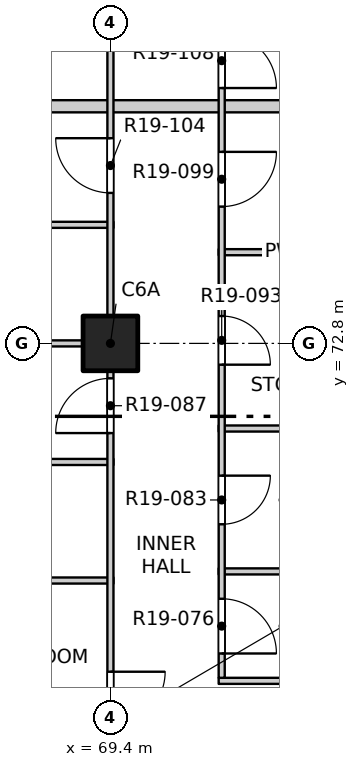
"""IFC4 building model, lengths in metres.
Left out: names, types, materials, properties, quantities, classifications, styles, units other than length and angle.
Written with IfcOpenShell. Run it as: python <this file> out.ifc"""

import sys

from ifc_helpers import new_model, si_unit, direction, frame, frame_2d, origin, origin_2d, place, context, subcontext, project, spatial, rectangle, extrude, element, fill, save


model = new_model("IFC4")
c1 = context("Model", 3, precision=1e-05, world=origin(), true_north=direction((0.0, 1.0)))
c2 = subcontext(c1, "Body", "Model", "MODEL_VIEW")
j1 = project(units=[si_unit("LENGTHUNIT", "METRE"), si_unit("PLANEANGLEUNIT", "RADIAN")], contexts=[c1])
p1 = place(None, origin())
s1 = spatial("IfcSite", under=j1, at=p1, CompositionType="ELEMENT")
p2 = place(p1, origin())
s2 = spatial("IfcBuilding", under=s1, at=p2, CompositionType="ELEMENT")
p3 = place(p2, frame((0.0, 0.0, 197.3)))
s3 = spatial("IfcBuildingStorey", under=s2, at=p3, CompositionType="ELEMENT", Elevation=197.3)
p4 = place(p3, frame((69.4, 72.8, -0.3), z_axis=(0.0, 0.0, 1.0), x_axis=(1.0, 0.0, 0.0)))
e1 = element("IfcColumn", 1, at=p4, inside=s3, PredefinedType="COLUMN", context=c2, shape_type="SweptSolid", body=[
    extrude(rectangle(XDim=0.9, YDim=0.9, at=origin_2d()), origin(), (0.0, 0.0, 1.0), 3.45),
])
p5 = place(p3, frame((71.18, 67.25, 0.0), z_axis=(0.0, 0.0, 1.0), x_axis=(1.0, 0.0, 0.0)))
e2 = element("IfcWall", 2, at=p5, inside=s3, PredefinedType="PARTITIONING", context=c2, shape_type="SweptSolid", body=[
    extrude(rectangle(XDim=2.22, YDim=0.1, at=frame_2d((1.11, 0.0))), origin(), (0.0, 0.0, 1.0), 3.15),
])
p6 = place(p3, frame((61.9, 68.9, 0.0), z_axis=(0.0, 0.0, 1.0), x_axis=(1.0, 0.0, 0.0)))
e3 = element("IfcWall", 3, at=p6, inside=s3, PredefinedType="PARTITIONING", context=c2, shape_type="SweptSolid", body=[
    extrude(rectangle(XDim=7.55, YDim=0.1, at=frame_2d((3.775, 0.0))), origin(), (0.0, 0.0, 1.0), 2.55),
])
p7 = place(p3, frame((71.18, 69.05, 0.0), z_axis=(0.0, 0.0, 1.0), x_axis=(1.0, 0.0, 0.0)))
e4 = element("IfcWall", 4, at=p7, inside=s3, PredefinedType="PARTITIONING", context=c2, shape_type="SweptSolid", body=[
    extrude(rectangle(XDim=2.22, YDim=0.1, at=frame_2d((1.11, 0.0))), origin(), (0.0, 0.0, 1.0), 2.55),
])
p8 = place(p3, frame((65.75, 70.85, 0.0), z_axis=(0.0, 0.0, 1.0), x_axis=(1.0, 0.0, 0.0)))
e5 = element("IfcWall", 5, at=p8, inside=s3, PredefinedType="PARTITIONING", context=c2, shape_type="SweptSolid", body=[
    extrude(rectangle(XDim=3.7, YDim=0.1, at=frame_2d((1.85, 0.0))), origin(), (0.0, 0.0, 1.0), 3.15),
])
p9 = place(p3, frame((71.18, 71.4, 0.0), z_axis=(0.0, 0.0, 1.0), x_axis=(1.0, 0.0, 0.0)))
e6 = element("IfcWall", 6, at=p9, inside=s3, PredefinedType="PARTITIONING", context=c2, shape_type="SweptSolid", body=[
    extrude(rectangle(XDim=2.22, YDim=0.1, at=frame_2d((1.11, 0.0))), origin(), (0.0, 0.0, 1.0), 3.15),
])
p10 = place(p3, frame((61.9, 72.8, 0.0), z_axis=(0.0, 0.0, 1.0), x_axis=(1.0, 0.0, 0.0)))
e7 = element("IfcWall", 7, at=p10, inside=s3, PredefinedType="PARTITIONING", context=c2, shape_type="SweptSolid", body=[
    extrude(rectangle(XDim=7.55, YDim=0.1, at=frame_2d((3.775, 0.0))), origin(), (0.0, 0.0, 1.0), 3.15),
])
p11 = place(p3, frame((71.18, 74.3, 0.0), z_axis=(0.0, 0.0, 1.0), x_axis=(1.0, 0.0, 0.0)))
e8 = element("IfcWall", 8, at=p11, inside=s3, PredefinedType="PARTITIONING", context=c2, shape_type="SweptSolid", body=[
    extrude(rectangle(XDim=2.22, YDim=0.1, at=frame_2d((1.11, 0.0))), origin(), (0.0, 0.0, 1.0), 3.15),
])
p12 = place(p3, frame((65.75, 74.75, 0.0), z_axis=(0.0, 0.0, 1.0), x_axis=(1.0, 0.0, 0.0)))
e9 = element("IfcWall", 9, at=p12, inside=s3, PredefinedType="PARTITIONING", context=c2, shape_type="SweptSolid", body=[
    extrude(rectangle(XDim=3.7, YDim=0.1, at=frame_2d((1.85, 0.0))), origin(), (0.0, 0.0, 1.0), 3.15),
])
p13 = place(p3, frame((61.9, 76.7, 0.0), z_axis=(0.0, 0.0, 1.0), x_axis=(1.0, 0.0, 0.0)))
e10 = element("IfcWall", 10, at=p13, inside=s3, PredefinedType="PARTITIONING", context=c2, shape_type="SweptSolid", body=[
    extrude(rectangle(XDim=11.5, YDim=0.2, at=frame_2d((5.75, 0.0))), origin(), (0.0, 0.0, 1.0), 2.55),
])
p14 = place(p3, frame((69.4, 41.9, 0.0), z_axis=(0.0, 0.0, 1.0), x_axis=(0.0, 1.0, 0.0)))
e11 = element("IfcWall", 11, at=p14, inside=s3, PredefinedType="PARTITIONING", context=c2, shape_type="SweptSolid", body=[
    extrude(rectangle(XDim=46.2, YDim=0.1, at=frame_2d((23.1, 0.0))), origin(), (0.0, 0.0, 1.0), 3.15),
])
p15 = place(p14, frame((1.2, 0.0, 0.0)))
e12 = element("IfcOpeningElement", 12, at=p15, cuts=e11, PredefinedType="OPENING", context=c2, shape_type="SweptSolid", body=[
    extrude(rectangle(XDim=0.9, YDim=2.1, at=frame_2d((0.45, 1.05))), frame((0.0, 0.06, 0.0), z_axis=(0.0, -1.0, 0.0), x_axis=(1.0, 0.0, 0.0)), (0.0, 0.0, 1.0), 0.12),
])
p16 = place(p14, frame((5.1, 0.0, 0.0)))
e13 = element("IfcOpeningElement", 13, at=p16, cuts=e11, PredefinedType="OPENING", context=c2, shape_type="SweptSolid", body=[
    extrude(rectangle(XDim=0.9, YDim=2.1, at=frame_2d((0.45, 1.05))), frame((0.0, 0.06, 0.0), z_axis=(0.0, -1.0, 0.0), x_axis=(1.0, 0.0, 0.0)), (0.0, 0.0, 1.0), 0.12),
])
p17 = place(p14, frame((9.0, 0.0, 0.0)))
e14 = element("IfcOpeningElement", 14, at=p17, cuts=e11, PredefinedType="OPENING", context=c2, shape_type="SweptSolid", body=[
    extrude(rectangle(XDim=0.9, YDim=2.1, at=frame_2d((0.45, 1.05))), frame((0.0, 0.06, 0.0), z_axis=(0.0, -1.0, 0.0), x_axis=(1.0, 0.0, 0.0)), (0.0, 0.0, 1.0), 0.12),
])
p18 = place(p14, frame((13.85, 0.0, 0.0)))
e15 = element("IfcOpeningElement", 15, at=p18, cuts=e11, PredefinedType="OPENING", context=c2, shape_type="SweptSolid", body=[
    extrude(rectangle(XDim=0.9, YDim=2.1, at=frame_2d((0.45, 1.05))), frame((0.0, 0.06, 0.0), z_axis=(0.0, -1.0, 0.0), x_axis=(1.0, 0.0, 0.0)), (0.0, 0.0, 1.0), 0.12),
])
p19 = place(p14, frame((17.775, 0.0, 0.0)))
e16 = element("IfcOpeningElement", 16, at=p19, cuts=e11, PredefinedType="OPENING", context=c2, shape_type="SweptSolid", body=[
    extrude(rectangle(XDim=0.9, YDim=2.1, at=frame_2d((0.45, 1.05))), frame((0.0, 0.06, 0.0), z_axis=(0.0, -1.0, 0.0), x_axis=(1.0, 0.0, 0.0)), (0.0, 0.0, 1.0), 0.12),
])
p20 = place(p14, frame((21.625, 0.0, 0.0)))
e17 = element("IfcOpeningElement", 17, at=p20, cuts=e11, PredefinedType="OPENING", context=c2, shape_type="SweptSolid", body=[
    extrude(rectangle(XDim=0.9, YDim=2.1, at=frame_2d((0.45, 1.05))), frame((0.0, 0.06, 0.0), z_axis=(0.0, -1.0, 0.0), x_axis=(1.0, 0.0, 0.0)), (0.0, 0.0, 1.0), 0.12),
])
p21 = place(p14, frame((24.6, 0.0, 0.0)))
e18 = element("IfcOpeningElement", 18, at=p21, cuts=e11, PredefinedType="OPENING", context=c2, shape_type="SweptSolid", body=[
    extrude(rectangle(XDim=0.9, YDim=2.1, at=frame_2d((0.45, 1.05))), frame((0.0, 0.06, 0.0), z_axis=(0.0, -1.0, 0.0), x_axis=(1.0, 0.0, 0.0)), (0.0, 0.0, 1.0), 0.12),
])
p22 = place(p14, frame((29.425, 0.0, 0.0)))
e19 = element("IfcOpeningElement", 19, at=p22, cuts=e11, PredefinedType="OPENING", context=c2, shape_type="SweptSolid", body=[
    extrude(rectangle(XDim=0.9, YDim=2.1, at=frame_2d((0.45, 1.05))), frame((0.0, 0.06, 0.0), z_axis=(0.0, -1.0, 0.0), x_axis=(1.0, 0.0, 0.0)), (0.0, 0.0, 1.0), 0.12),
])
p23 = place(p14, frame((33.375, 0.0, 0.0)))
e20 = element("IfcOpeningElement", 20, at=p23, cuts=e11, PredefinedType="OPENING", context=c2, shape_type="SweptSolid", body=[
    extrude(rectangle(XDim=0.9, YDim=2.1, at=frame_2d((0.45, 1.05))), frame((0.0, 0.06, 0.0), z_axis=(0.0, -1.0, 0.0), x_axis=(1.0, 0.0, 0.0)), (0.0, 0.0, 1.0), 0.12),
])
p24 = place(p14, frame((37.225, 0.0, 0.0)))
e21 = element("IfcOpeningElement", 21, at=p24, cuts=e11, PredefinedType="OPENING", context=c2, shape_type="SweptSolid", body=[
    extrude(rectangle(XDim=0.9, YDim=2.1, at=frame_2d((0.45, 1.05))), frame((0.0, 0.06, 0.0), z_axis=(0.0, -1.0, 0.0), x_axis=(1.0, 0.0, 0.0)), (0.0, 0.0, 1.0), 0.12),
])
p25 = place(p14, frame((40.2, 0.0, 0.0)))
e22 = element("IfcOpeningElement", 22, at=p25, cuts=e11, PredefinedType="OPENING", context=c2, shape_type="SweptSolid", body=[
    extrude(rectangle(XDim=0.9, YDim=2.1, at=frame_2d((0.45, 1.05))), frame((0.0, 0.06, 0.0), z_axis=(0.0, -1.0, 0.0), x_axis=(1.0, 0.0, 0.0)), (0.0, 0.0, 1.0), 0.12),
])
p26 = place(p14, frame((44.1, 0.0, 0.0)))
e23 = element("IfcOpeningElement", 23, at=p26, cuts=e11, PredefinedType="OPENING", context=c2, shape_type="SweptSolid", body=[
    extrude(rectangle(XDim=0.9, YDim=2.1, at=frame_2d((0.45, 1.05))), frame((0.0, 0.06, 0.0), z_axis=(0.0, -1.0, 0.0), x_axis=(1.0, 0.0, 0.0)), (0.0, 0.0, 1.0), 0.12),
])
p27 = place(p3, frame((71.23, 67.3, 0.0), z_axis=(0.0, 0.0, 1.0), x_axis=(0.0, 1.0, 0.0)))
e24 = element("IfcWall", 24, at=p27, inside=s3, PredefinedType="PARTITIONING", context=c2, shape_type="SweptSolid", body=[
    extrude(rectangle(XDim=14.55, YDim=0.1, at=frame_2d((7.275, 0.0))), origin(), (0.0, 0.0, 1.0), 3.15),
])
p28 = place(p27, frame((0.4, 0.0, 0.0)))
e25 = element("IfcOpeningElement", 25, at=p28, cuts=e24, PredefinedType="OPENING", context=c2, shape_type="SweptSolid", body=[
    extrude(rectangle(XDim=0.9, YDim=2.1, at=frame_2d((0.45, 1.05))), frame((0.0, 0.06, 0.0), z_axis=(0.0, -1.0, 0.0), x_axis=(1.0, 0.0, 0.0)), (0.0, 0.0, 1.0), 0.12),
])
p29 = place(p27, frame((2.525, 0.0, 0.0)))
e26 = element("IfcOpeningElement", 26, at=p29, cuts=e24, PredefinedType="OPENING", context=c2, shape_type="SweptSolid", body=[
    extrude(rectangle(XDim=0.8, YDim=2.1, at=frame_2d((0.4, 1.05))), frame((0.0, 0.06, 0.0), z_axis=(0.0, -1.0, 0.0), x_axis=(1.0, 0.0, 0.0)), (0.0, 0.0, 1.0), 0.12),
])
p30 = place(p27, frame((5.15, 0.0, 0.0)))
e27 = element("IfcOpeningElement", 27, at=p30, cuts=e24, PredefinedType="OPENING", context=c2, shape_type="SweptSolid", body=[
    extrude(rectangle(XDim=0.8, YDim=2.1, at=frame_2d((0.4, 1.05))), frame((0.0, 0.06, 0.0), z_axis=(0.0, -1.0, 0.0), x_axis=(1.0, 0.0, 0.0)), (0.0, 0.0, 1.0), 0.12),
])
p31 = place(p27, frame((7.75, 0.0, 0.0)))
e28 = element("IfcOpeningElement", 28, at=p31, cuts=e24, PredefinedType="OPENING", context=c2, shape_type="SweptSolid", body=[
    extrude(rectangle(XDim=0.9, YDim=2.1, at=frame_2d((0.45, 1.05))), frame((0.0, 0.06, 0.0), z_axis=(0.0, -1.0, 0.0), x_axis=(1.0, 0.0, 0.0)), (0.0, 0.0, 1.0), 0.12),
])
p32 = place(p27, frame((9.7, 0.0, 0.0)))
e29 = element("IfcOpeningElement", 29, at=p32, cuts=e24, PredefinedType="OPENING", context=c2, shape_type="SweptSolid", body=[
    extrude(rectangle(XDim=0.9, YDim=2.1, at=frame_2d((0.45, 1.05))), frame((0.0, 0.06, 0.0), z_axis=(0.0, -1.0, 0.0), x_axis=(1.0, 0.0, 0.0)), (0.0, 0.0, 1.0), 0.12),
])
p33 = place(p27, frame((11.2, 0.0, 0.0)))
e30 = element("IfcOpeningElement", 30, at=p33, cuts=e24, PredefinedType="OPENING", context=c2, shape_type="SweptSolid", body=[
    extrude(rectangle(XDim=0.8, YDim=2.1, at=frame_2d((0.4, 1.05))), frame((0.0, 0.06, 0.0), z_axis=(0.0, -1.0, 0.0), x_axis=(1.0, 0.0, 0.0)), (0.0, 0.0, 1.0), 0.12),
])
p34 = place(p27, frame((13.0, 0.0, 0.0)))
e31 = element("IfcOpeningElement", 31, at=p34, cuts=e24, PredefinedType="OPENING", context=c2, shape_type="SweptSolid", body=[
    extrude(rectangle(XDim=0.9, YDim=2.1, at=frame_2d((0.45, 1.05))), frame((0.0, 0.06, 0.0), z_axis=(0.0, -1.0, 0.0), x_axis=(1.0, 0.0, 0.0)), (0.0, 0.0, 1.0), 0.12),
])
p35 = place(p21, origin())
e32 = element("IfcDoor", 32, at=p35, inside=s3, OperationType="SINGLE_SWING_LEFT", PredefinedType="DOOR", context=c2, shape_type="SweptSolid", body=[
    extrude(rectangle(XDim=0.9, YDim=2.1, at=frame_2d((0.45, 1.05))), frame((0.0, 0.025, 0.0), z_axis=(0.0, -1.0, 0.0), x_axis=(1.0, 0.0, 0.0)), (0.0, 0.0, 1.0), 0.05),
])
fill(e18, e32)
p36 = place(p28, origin())
e33 = element("IfcDoor", 33, at=p36, inside=s3, OperationType="SINGLE_SWING_RIGHT", PredefinedType="DOOR", context=c2, shape_type="SweptSolid", body=[
    extrude(rectangle(XDim=0.9, YDim=2.1, at=frame_2d((0.45, 1.05))), frame((0.0, 0.025, 0.0), z_axis=(0.0, -1.0, 0.0), x_axis=(1.0, 0.0, 0.0)), (0.0, 0.0, 1.0), 0.05),
])
fill(e25, e33)
p37 = place(p29, origin())
e34 = element("IfcDoor", 34, at=p37, inside=s3, OperationType="SINGLE_SWING_LEFT", PredefinedType="DOOR", context=c2, shape_type="SweptSolid", body=[
    extrude(rectangle(XDim=0.8, YDim=2.1, at=frame_2d((0.4, 1.05))), frame((0.0, 0.025, 0.0), z_axis=(0.0, -1.0, 0.0), x_axis=(1.0, 0.0, 0.0)), (0.0, 0.0, 1.0), 0.05),
])
fill(e26, e34)
p38 = place(p22, origin())
e35 = element("IfcDoor", 35, at=p38, inside=s3, OperationType="SINGLE_SWING_LEFT", PredefinedType="DOOR", context=c2, shape_type="SweptSolid", body=[
    extrude(rectangle(XDim=0.9, YDim=2.1, at=frame_2d((0.45, 1.05))), frame((0.0, 0.025, 0.0), z_axis=(0.0, -1.0, 0.0), x_axis=(1.0, 0.0, 0.0)), (0.0, 0.0, 1.0), 0.05),
])
fill(e19, e35)
p39 = place(p30, origin())
e36 = element("IfcDoor", 36, at=p39, inside=s3, OperationType="SINGLE_SWING_RIGHT", PredefinedType="DOOR", context=c2, shape_type="SweptSolid", body=[
    extrude(rectangle(XDim=0.8, YDim=2.1, at=frame_2d((0.4, 1.05))), frame((0.0, 0.025, 0.0), z_axis=(0.0, -1.0, 0.0), x_axis=(1.0, 0.0, 0.0)), (0.0, 0.0, 1.0), 0.05),
])
fill(e27, e36)
p40 = place(p31, origin())
e37 = element("IfcDoor", 37, at=p40, inside=s3, OperationType="SINGLE_SWING_LEFT", PredefinedType="DOOR", context=c2, shape_type="SweptSolid", body=[
    extrude(rectangle(XDim=0.9, YDim=2.1, at=frame_2d((0.45, 1.05))), frame((0.0, 0.025, 0.0), z_axis=(0.0, -1.0, 0.0), x_axis=(1.0, 0.0, 0.0)), (0.0, 0.0, 1.0), 0.05),
])
fill(e28, e37)
p41 = place(p23, origin())
e38 = element("IfcDoor", 38, at=p41, inside=s3, OperationType="SINGLE_SWING_RIGHT", PredefinedType="DOOR", context=c2, shape_type="SweptSolid", body=[
    extrude(rectangle(XDim=0.9, YDim=2.1, at=frame_2d((0.45, 1.05))), frame((0.0, 0.025, 0.0), z_axis=(0.0, -1.0, 0.0), x_axis=(1.0, 0.0, 0.0)), (0.0, 0.0, 1.0), 0.05),
])
fill(e20, e38)
p42 = place(p32, origin())
e39 = element("IfcDoor", 39, at=p42, inside=s3, OperationType="SINGLE_SWING_RIGHT", PredefinedType="DOOR", context=c2, shape_type="SweptSolid", body=[
    extrude(rectangle(XDim=0.9, YDim=2.1, at=frame_2d((0.45, 1.05))), frame((0.0, 0.025, 0.0), z_axis=(0.0, -1.0, 0.0), x_axis=(1.0, 0.0, 0.0)), (0.0, 0.0, 1.0), 0.05),
])
fill(e29, e39)
save(model, sys.argv[1])
